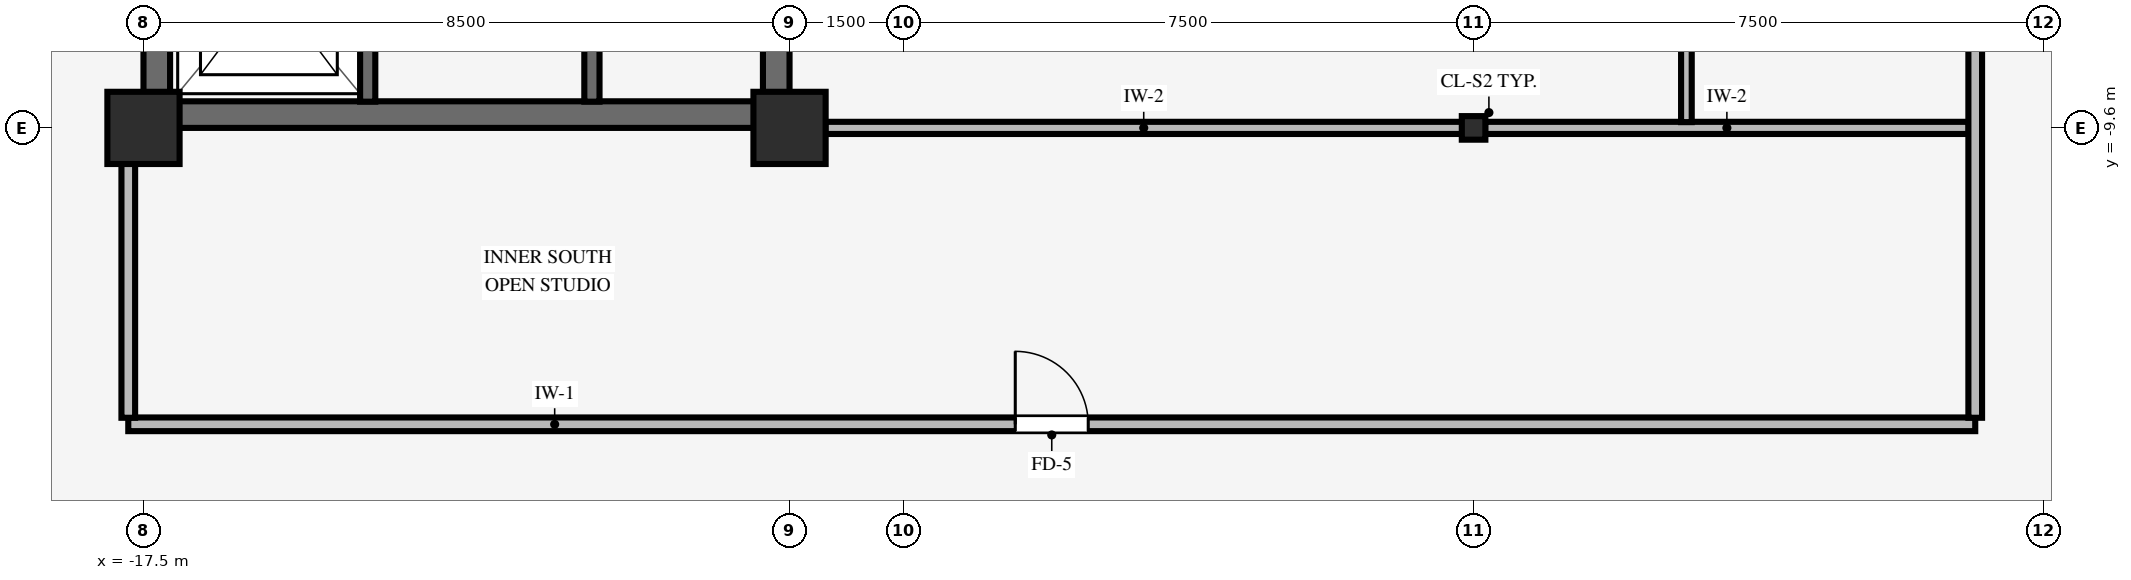
"""IFC4 building model, lengths in metres.
Left out: names, types, materials, properties, quantities, classifications, styles, units other than length and angle.
Written with IfcOpenShell. Run it as: python <this file> out.ifc"""

import sys

from ifc_helpers import new_model, si_unit, direction, frame, frame_2d, origin, origin_2d, place, context, subcontext, project, spatial, rectangle, i_section, extrude, source, transform, mapped, element, fill, save


model = new_model("IFC4")
c1 = context("Model", 3, precision=1e-05, world=origin(), true_north=direction((0.0, 1.0)))
c2 = subcontext(c1, "Body", "Model", "MODEL_VIEW")
j1 = project(units=[si_unit("LENGTHUNIT", "METRE"), si_unit("PLANEANGLEUNIT", "RADIAN")], contexts=[c1])
p1 = place(None, origin())
s1 = spatial("IfcSite", under=j1, at=p1, CompositionType="ELEMENT")
p2 = place(p1, origin())
s2 = spatial("IfcBuilding", under=s1, at=p2, CompositionType="ELEMENT")
p3 = place(p2, frame((0.0, 0.0, 194.55)))
s3 = spatial("IfcBuildingStorey", under=s2, at=p3, CompositionType="ELEMENT", Elevation=194.55)
p4 = place(p3, frame((-17.5, -9.425, 0.0), z_axis=(0.0, 0.0, 1.0), x_axis=(1.0, 0.0, 0.0)))
e1 = element("IfcWall", 1, at=p4, inside=s3, PredefinedType="SHEAR", context=c2, shape_type="SweptSolid", body=[
    extrude(rectangle(XDim=8.5, YDim=0.35, at=frame_2d((4.25, 0.0))), origin(), (0.0, 0.0, 1.0), 3.37),
])
p5 = place(p3, frame((-17.325, -9.255, 0.0), z_axis=(0.0, 0.0, 1.0), x_axis=(0.0, 1.0, 0.0)))
e2 = element("IfcWall", 2, at=p5, inside=s3, PredefinedType="SHEAR", context=c2, shape_type="SweptSolid", body=[
    extrude(rectangle(XDim=18.51, YDim=0.35, at=frame_2d((9.255, 0.0))), origin(), (0.0, 0.0, 1.0), 3.37),
])
p6 = place(p3, frame((-9.175, -9.255, 0.0), z_axis=(0.0, 0.0, 1.0), x_axis=(0.0, 1.0, 0.0)))
e3 = element("IfcWall", 3, at=p6, inside=s3, PredefinedType="SHEAR", context=c2, shape_type="SweptSolid", body=[
    extrude(rectangle(XDim=18.51, YDim=0.35, at=frame_2d((9.255, 0.0))), origin(), (0.0, 0.0, 1.0), 3.37),
])
p7 = place(p6, frame((8.655, 0.0, 0.0)))
e4 = element("IfcOpeningElement", 4, at=p7, cuts=e3, PredefinedType="OPENING", context=c2, shape_type="SweptSolid", body=[
    extrude(rectangle(XDim=1.2, YDim=2.15, at=frame_2d((0.6, 1.075))), frame((0.0, 0.185, 0.0), z_axis=(0.0, -1.0, 0.0), x_axis=(1.0, 0.0, 0.0)), (0.0, 0.0, 1.0), 0.37),
])
for number, where, z_axis, x_axis in (
    (5, (-17.5, -9.6, 0.0), (0.0, 0.0, 1.0), (1.0, 0.0, 0.0)),
    (6, (-9.0, -9.6, 0.0), (0.0, 0.0, 1.0), (1.0, 0.0, 0.0)),
):
    element("IfcColumn", number, at=place(p3, frame(where, z_axis=z_axis, x_axis=x_axis)), inside=s3, PredefinedType="COLUMN", context=c2, shape_type="SweptSolid", body=[
        extrude(rectangle(XDim=0.95, YDim=0.95, at=origin_2d()), origin(), (0.0, 0.0, 1.0), 3.37),
    ])
p8 = place(p3, frame((0.0, -9.6, 0.0), z_axis=(0.0, 0.0, 1.0), x_axis=(1.0, 0.0, 0.0)))
e7 = element("IfcColumn", 7, at=p8, inside=s3, PredefinedType="COLUMN", context=c2, shape_type="SweptSolid", body=[
    extrude(i_section(OverallWidth=0.31, OverallDepth=0.31, WebThickness=0.015, FlangeThickness=0.015, FilletRadius=0.015, at=origin_2d()), origin(), (0.0, 0.0, 1.0), 3.37),
])
p9 = place(p3, frame((-14.55, -9.255, 0.0), z_axis=(0.0, 0.0, 1.0), x_axis=(0.0, 1.0, 0.0)))
e8 = element("IfcWall", 8, at=p9, inside=s3, PredefinedType="SHEAR", context=c2, shape_type="SweptSolid", body=[
    extrude(rectangle(XDim=3.06, YDim=0.2, at=frame_2d((1.53, 0.0))), origin(), (0.0, 0.0, 1.0), 3.37),
])
p10 = place(p9, frame((0.98, 0.0, 0.0)))
e9 = element("IfcOpeningElement", 9, at=p10, cuts=e8, PredefinedType="OPENING", context=c2, shape_type="SweptSolid", body=[
    extrude(rectangle(XDim=1.15, YDim=2.15, at=frame_2d((0.575, 1.075))), frame((0.0, 0.11, 0.0), z_axis=(0.0, -1.0, 0.0), x_axis=(1.0, 0.0, 0.0)), (0.0, 0.0, 1.0), 0.22),
])
p11 = place(p3, frame((-11.6, -9.255, 0.0), z_axis=(0.0, 0.0, 1.0), x_axis=(0.0, 1.0, 0.0)))
e10 = element("IfcWall", 10, at=p11, inside=s3, PredefinedType="SHEAR", context=c2, shape_type="SweptSolid", body=[
    extrude(rectangle(XDim=8.025, YDim=0.2, at=frame_2d((4.012, 0.0))), origin(), (0.0, 0.0, 1.0), 3.37),
])
p12 = place(p11, frame((5.615, 0.0, 0.0)))
e11 = element("IfcOpeningElement", 11, at=p12, cuts=e10, PredefinedType="OPENING", context=c2, shape_type="SweptSolid", body=[
    extrude(rectangle(XDim=0.88, YDim=2.1, at=frame_2d((0.44, 1.05))), frame((0.0, 0.11, 0.0), z_axis=(0.0, -1.0, 0.0), x_axis=(1.0, 0.0, 0.0)), (0.0, 0.0, 1.0), 0.22),
])
p13 = place(p3, frame((-17.7, -13.5, 0.0), z_axis=(0.0, 0.0, 1.0), x_axis=(1.0, 0.0, 0.0)))
e12 = element("IfcWall", 12, at=p13, inside=s3, PredefinedType="PARTITIONING", context=c2, shape_type="SweptSolid", body=[
    extrude(rectangle(XDim=24.3, YDim=0.18, at=frame_2d((12.15, 0.0))), origin(), (0.0, 0.0, 1.0), 3.008),
])
p14 = place(p13, frame((11.67, 0.0, 0.0)))
e13 = element("IfcOpeningElement", 13, at=p14, cuts=e12, PredefinedType="OPENING", context=c2, shape_type="SweptSolid", body=[
    extrude(rectangle(XDim=0.96, YDim=2.1, at=frame_2d((0.48, 1.05))), frame((0.0, 0.1, 0.0), z_axis=(0.0, -1.0, 0.0), x_axis=(1.0, 0.0, 0.0)), (0.0, 0.0, 1.0), 0.2),
])
p15 = place(p3, frame((-8.529, -9.6, 0.0), z_axis=(0.0, 0.0, 1.0), x_axis=(1.0, 0.0, 0.0)))
e14 = element("IfcWall", 14, at=p15, inside=s3, PredefinedType="PARTITIONING", context=c2, shape_type="SweptSolid", body=[
    extrude(rectangle(XDim=8.378, YDim=0.16, at=frame_2d((4.189, 0.0))), origin(), (0.0, 0.0, 1.0), 2.405),
])
p16 = place(p3, frame((0.151, -9.6, 0.0), z_axis=(0.0, 0.0, 1.0), x_axis=(1.0, 0.0, 0.0)))
e15 = element("IfcWall", 15, at=p16, inside=s3, PredefinedType="PARTITIONING", context=c2, shape_type="SweptSolid", body=[
    extrude(rectangle(XDim=6.363, YDim=0.16, at=frame_2d((3.182, 0.0))), origin(), (0.0, 0.0, 1.0), 2.405),
])
p17 = place(p3, frame((-17.7, -13.414, 0.0), z_axis=(0.0, 0.0, 1.0), x_axis=(0.0, 1.0, 0.0)))
e16 = element("IfcWall", 16, at=p17, inside=s3, PredefinedType="PARTITIONING", context=c2, shape_type="SweptSolid", body=[
    extrude(rectangle(XDim=3.343, YDim=0.18, at=frame_2d((1.671, 0.0))), origin(), (0.0, 0.0, 1.0), 2.816),
])
p18 = place(p3, frame((2.8, -9.524, 0.0), z_axis=(0.0, 0.0, 1.0), x_axis=(0.0, 1.0, 0.0)))
e17 = element("IfcWall", 17, at=p18, inside=s3, PredefinedType="PARTITIONING", context=c2, shape_type="SweptSolid", body=[
    extrude(rectangle(XDim=8.188, YDim=0.14, at=frame_2d((4.094, 0.0))), origin(), (0.0, 0.0, 1.0), 3.36),
])
p19 = place(p3, frame((6.6, -13.414, 0.0), z_axis=(0.0, 0.0, 1.0), x_axis=(0.0, 1.0, 0.0)))
e18 = element("IfcWall", 18, at=p19, inside=s3, PredefinedType="PARTITIONING", context=c2, shape_type="SweptSolid", body=[
    extrude(rectangle(XDim=12.078, YDim=0.18, at=frame_2d((6.039, 0.0))), origin(), (0.0, 0.0, 1.0), 3.36),
])
p20 = place(p19, frame((7.466, 0.0, 0.0)))
e19 = element("IfcOpeningElement", 19, at=p20, cuts=e18, PredefinedType="OPENING", context=c2, shape_type="SweptSolid", body=[
    extrude(rectangle(XDim=0.96, YDim=2.1, at=frame_2d((0.48, 1.05))), frame((0.0, 0.1, 0.0), z_axis=(0.0, -1.0, 0.0), x_axis=(1.0, 0.0, 0.0)), (0.0, 0.0, 1.0), 0.2),
])
m1 = source(origin(), c2, "Body", "SweptSolid", [
    extrude(rectangle(XDim=0.96, YDim=2.1, at=frame_2d((0.48, 1.05))), frame((0.0, 0.025, 0.0), z_axis=(0.0, -1.0, 0.0), x_axis=(1.0, 0.0, 0.0)), (0.0, 0.0, 1.0), 0.05),
])
p21 = place(p14, origin())
e20 = element("IfcDoor", 20, at=p21, inside=s3, OperationType="SINGLE_SWING_LEFT", PredefinedType="DOOR", context=c2, shape_type="MappedRepresentation", body=[
    mapped(m1, transform((0.0, 0.0, 0.0), scale=1.0)),
])
fill(e13, e20)
save(model, sys.argv[1])
